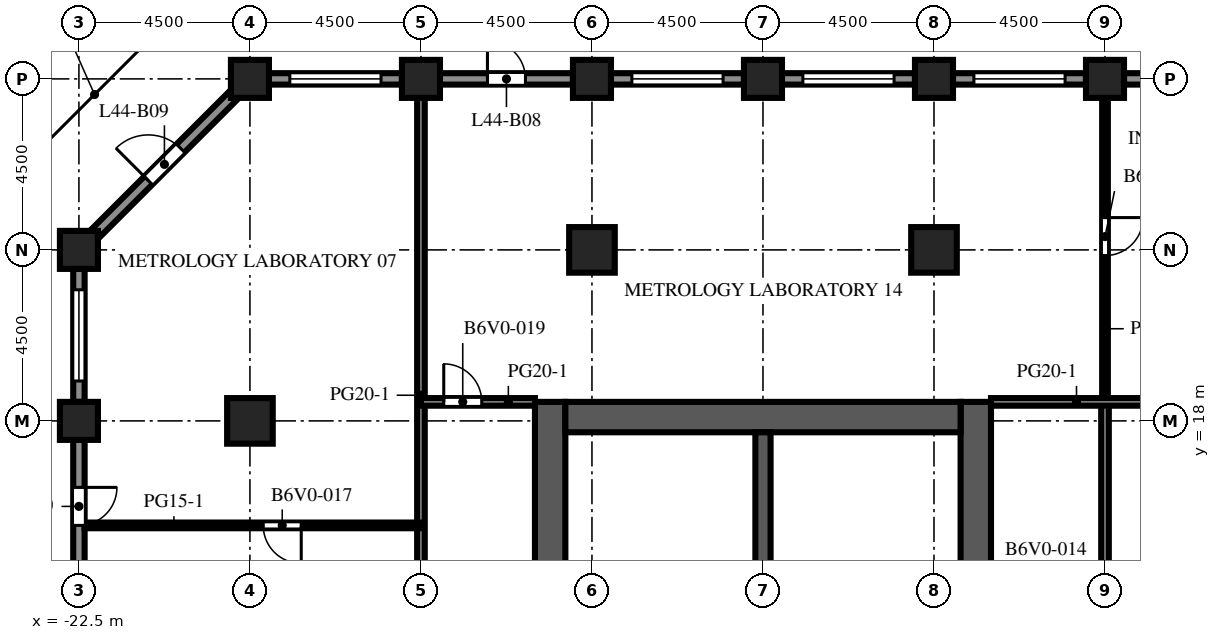
"""IFC4 building model, lengths in metres.
Left out: names, types, materials, properties, quantities, classifications, styles, units other than length and angle.
Written with IfcOpenShell. Run it as: python <this file> out.ifc"""

import sys

from ifc_helpers import new_model, si_unit, direction, frame, frame_2d, origin, origin_2d, place, context, subcontext, project, spatial, rectangle, extrude, element, fill, save


model = new_model("IFC4")
c1 = context("Model", 3, precision=1e-05, world=origin(), true_north=direction((0.0, 1.0)))
c2 = subcontext(c1, "Body", "Model", "MODEL_VIEW")
j1 = project(units=[si_unit("LENGTHUNIT", "METRE"), si_unit("PLANEANGLEUNIT", "RADIAN")], contexts=[c1])
p1 = place(None, origin())
s1 = spatial("IfcSite", under=j1, at=p1, CompositionType="ELEMENT")
p2 = place(p1, origin())
s2 = spatial("IfcBuilding", under=s1, at=p2, CompositionType="ELEMENT")
p3 = place(p2, frame((0.0, 0.0, 195.6)))
s3 = spatial("IfcBuildingStorey", under=s2, at=p3, CompositionType="ELEMENT", Elevation=195.6)
for number, where, z_axis, x_axis in (
    (1, (-22.5, 18.0, 0.0), (0.0, 0.0, 1.0), (1.0, 0.0, 0.0)),
    (2, (-22.5, 22.5, 0.0), (0.0, 0.0, 1.0), (1.0, 0.0, 0.0)),
    (3, (-18.0, 27.0, 0.0), (0.0, 0.0, 1.0), (1.0, 0.0, 0.0)),
    (4, (-13.5, 27.0, 0.0), (0.0, 0.0, 1.0), (1.0, 0.0, 0.0)),
    (5, (-9.0, 27.0, 0.0), (0.0, 0.0, 1.0), (1.0, 0.0, 0.0)),
    (6, (-4.5, 27.0, 0.0), (0.0, 0.0, 1.0), (1.0, 0.0, 0.0)),
    (7, (0.0, 27.0, 0.0), (0.0, 0.0, 1.0), (1.0, 0.0, 0.0)),
    (8, (4.5, 27.0, 0.0), (0.0, 0.0, 1.0), (1.0, 0.0, 0.0)),
):
    element("IfcColumn", number, at=place(p3, frame(where, z_axis=z_axis, x_axis=x_axis)), inside=s3, PredefinedType="COLUMN", context=c2, shape_type="SweptSolid", body=[
        extrude(rectangle(XDim=1.0, YDim=1.0, at=origin_2d()), origin(), (0.0, 0.0, 1.0), 4.1),
    ])
for number, where, z_axis, x_axis in (
    (9, (-18.0, 18.0, 0.0), (0.0, 0.0, 1.0), (1.0, 0.0, 0.0)),
    (10, (-9.0, 22.5, 0.0), (0.0, 0.0, 1.0), (1.0, 0.0, 0.0)),
    (11, (0.0, 22.5, 0.0), (0.0, 0.0, 1.0), (1.0, 0.0, 0.0)),
):
    element("IfcColumn", number, at=place(p3, frame(where, z_axis=z_axis, x_axis=x_axis)), inside=s3, PredefinedType="COLUMN", context=c2, shape_type="SweptSolid", body=[
        extrude(rectangle(XDim=1.2, YDim=1.2, at=origin_2d()), origin(), (0.0, 0.0, 1.0), 4.1),
    ])
p4 = place(p3, frame((-10.1, -9.0, 0.0), z_axis=(0.0, 0.0, 1.0), x_axis=(0.0, 1.0, 0.0)))
e12 = element("IfcWall", 12, at=p4, inside=s3, PredefinedType="SHEAR", context=c2, shape_type="SweptSolid", body=[
    extrude(rectangle(XDim=27.5, YDim=0.8, at=frame_2d((13.75, 0.0))), origin(), (0.0, 0.0, 1.0), 4.1),
])
p5 = place(p4, frame((12.55, 0.0, 0.0)))
e13 = element("IfcOpeningElement", 13, at=p5, cuts=e12, PredefinedType="OPENING", context=c2, shape_type="SweptSolid", body=[
    extrude(rectangle(XDim=2.4, YDim=2.4, at=frame_2d((1.2, 1.2))), frame((0.0, 0.41, 0.0), z_axis=(0.0, -1.0, 0.0), x_axis=(1.0, 0.0, 0.0)), (0.0, 0.0, 1.0), 0.82),
])
p6 = place(p4, frame((6.825, 0.0, 0.0)))
e14 = element("IfcOpeningElement", 14, at=p6, cuts=e12, PredefinedType="OPENING", context=c2, shape_type="SweptSolid", body=[
    extrude(rectangle(XDim=1.2, YDim=2.1, at=frame_2d((0.6, 1.05))), frame((0.0, 0.41, 0.0), z_axis=(0.0, -1.0, 0.0), x_axis=(1.0, 0.0, 0.0)), (0.0, 0.0, 1.0), 0.82),
])
p7 = place(p4, frame((19.475, 0.0, 0.0)))
e15 = element("IfcOpeningElement", 15, at=p7, cuts=e12, PredefinedType="OPENING", context=c2, shape_type="SweptSolid", body=[
    extrude(rectangle(XDim=1.2, YDim=2.1, at=frame_2d((0.6, 1.05))), frame((0.0, 0.41, 0.0), z_axis=(0.0, -1.0, 0.0), x_axis=(1.0, 0.0, 0.0)), (0.0, 0.0, 1.0), 0.82),
])
p8 = place(p3, frame((1.1, -9.0, 0.0), z_axis=(0.0, 0.0, 1.0), x_axis=(0.0, 1.0, 0.0)))
e16 = element("IfcWall", 16, at=p8, inside=s3, PredefinedType="SHEAR", context=c2, shape_type="SweptSolid", body=[
    extrude(rectangle(XDim=27.5, YDim=0.8, at=frame_2d((13.75, 0.0))), origin(), (0.0, 0.0, 1.0), 4.1),
])
p9 = place(p8, frame((12.55, 0.0, 0.0)))
e17 = element("IfcOpeningElement", 17, at=p9, cuts=e16, PredefinedType="OPENING", context=c2, shape_type="SweptSolid", body=[
    extrude(rectangle(XDim=2.4, YDim=2.4, at=frame_2d((1.2, 1.2))), frame((0.0, 0.41, 0.0), z_axis=(0.0, -1.0, 0.0), x_axis=(1.0, 0.0, 0.0)), (0.0, 0.0, 1.0), 0.82),
])
p10 = place(p8, frame((3.95, 0.0, 0.0)))
e18 = element("IfcOpeningElement", 18, at=p10, cuts=e16, PredefinedType="OPENING", context=c2, shape_type="SweptSolid", body=[
    extrude(rectangle(XDim=1.2, YDim=2.1, at=frame_2d((0.6, 1.05))), frame((0.0, 0.41, 0.0), z_axis=(0.0, -1.0, 0.0), x_axis=(1.0, 0.0, 0.0)), (0.0, 0.0, 1.0), 0.82),
])
p11 = place(p8, frame((19.45, 0.0, 0.0)))
e19 = element("IfcOpeningElement", 19, at=p11, cuts=e16, PredefinedType="OPENING", context=c2, shape_type="SweptSolid", body=[
    extrude(rectangle(XDim=1.0, YDim=2.1, at=frame_2d((0.5, 1.05))), frame((0.0, 0.41, 0.0), z_axis=(0.0, -1.0, 0.0), x_axis=(1.0, 0.0, 0.0)), (0.0, 0.0, 1.0), 0.82),
])
p12 = place(p8, frame((21.137, 0.0, 0.0)))
e20 = element("IfcOpeningElement", 20, at=p12, cuts=e16, PredefinedType="OPENING", context=c2, shape_type="SweptSolid", body=[
    extrude(rectangle(XDim=1.0, YDim=2.1, at=frame_2d((0.5, 1.05))), frame((0.0, 0.41, 0.0), z_axis=(0.0, -1.0, 0.0), x_axis=(1.0, 0.0, 0.0)), (0.0, 0.0, 1.0), 0.82),
])
p13 = place(p8, frame((23.2, 0.0, 0.0)))
e21 = element("IfcOpeningElement", 21, at=p13, cuts=e16, PredefinedType="OPENING", context=c2, shape_type="SweptSolid", body=[
    extrude(rectangle(XDim=1.0, YDim=2.1, at=frame_2d((0.5, 1.05))), frame((0.0, 0.41, 0.0), z_axis=(0.0, -1.0, 0.0), x_axis=(1.0, 0.0, 0.0)), (0.0, 0.0, 1.0), 0.82),
])
p14 = place(p8, frame((25.262, 0.0, 0.0)))
e22 = element("IfcOpeningElement", 22, at=p14, cuts=e16, PredefinedType="OPENING", context=c2, shape_type="SweptSolid", body=[
    extrude(rectangle(XDim=1.0, YDim=2.1, at=frame_2d((0.5, 1.05))), frame((0.0, 0.41, 0.0), z_axis=(0.0, -1.0, 0.0), x_axis=(1.0, 0.0, 0.0)), (0.0, 0.0, 1.0), 0.82),
])
p15 = place(p3, frame((-9.7, 18.1, 0.0), z_axis=(0.0, 0.0, 1.0), x_axis=(1.0, 0.0, 0.0)))
e23 = element("IfcWall", 23, at=p15, inside=s3, PredefinedType="SHEAR", context=c2, shape_type="SweptSolid", body=[
    extrude(rectangle(XDim=10.4, YDim=0.8, at=frame_2d((5.2, 0.0))), origin(), (0.0, 0.0, 1.0), 4.1),
])
p16 = place(p3, frame((-4.5, 10.2, 0.0), z_axis=(0.0, 0.0, 1.0), x_axis=(0.0, 1.0, 0.0)))
e24 = element("IfcWall", 24, at=p16, inside=s3, PredefinedType="SHEAR", context=c2, shape_type="SweptSolid", body=[
    extrude(rectangle(XDim=7.5, YDim=0.4, at=frame_2d((3.75, 0.0))), origin(), (0.0, 0.0, 1.0), 4.1),
])
p17 = place(p3, frame((5.0, 27.0, 0.0), z_axis=(0.0, 0.0, 1.0), x_axis=(1.0, 0.0, 0.0)))
e25 = element("IfcWall", 25, at=p17, inside=s3, PredefinedType="SOLIDWALL", context=c2, shape_type="SweptSolid", body=[
    extrude(rectangle(XDim=3.5, YDim=0.3, at=frame_2d((1.75, 0.0))), origin(), (0.0, 0.0, 1.0), 2.85),
])
p18 = place(p17, frame((0.55, 0.0, 0.8)))
e26 = element("IfcOpeningElement", 26, at=p18, cuts=e25, PredefinedType="OPENING", context=c2, shape_type="SweptSolid", body=[
    extrude(rectangle(XDim=2.4, YDim=1.7, at=frame_2d((1.2, 0.85))), frame((0.0, 0.16, 0.0), z_axis=(0.0, -1.0, 0.0), x_axis=(1.0, 0.0, 0.0)), (0.0, 0.0, 1.0), 0.32),
])
p19 = place(p3, frame((0.5, 27.0, 0.0), z_axis=(0.0, 0.0, 1.0), x_axis=(1.0, 0.0, 0.0)))
e27 = element("IfcWall", 27, at=p19, inside=s3, PredefinedType="SOLIDWALL", context=c2, shape_type="SweptSolid", body=[
    extrude(rectangle(XDim=3.5, YDim=0.3, at=frame_2d((1.75, 0.0))), origin(), (0.0, 0.0, 1.0), 2.85),
])
p20 = place(p19, frame((0.55, 0.0, 0.8)))
e28 = element("IfcOpeningElement", 28, at=p20, cuts=e27, PredefinedType="OPENING", context=c2, shape_type="SweptSolid", body=[
    extrude(rectangle(XDim=2.4, YDim=1.7, at=frame_2d((1.2, 0.85))), frame((0.0, 0.16, 0.0), z_axis=(0.0, -1.0, 0.0), x_axis=(1.0, 0.0, 0.0)), (0.0, 0.0, 1.0), 0.32),
])
p21 = place(p3, frame((-4.0, 27.0, 0.0), z_axis=(0.0, 0.0, 1.0), x_axis=(1.0, 0.0, 0.0)))
e29 = element("IfcWall", 29, at=p21, inside=s3, PredefinedType="SOLIDWALL", context=c2, shape_type="SweptSolid", body=[
    extrude(rectangle(XDim=3.5, YDim=0.3, at=frame_2d((1.75, 0.0))), origin(), (0.0, 0.0, 1.0), 2.85),
])
p22 = place(p21, frame((0.55, 0.0, 0.8)))
e30 = element("IfcOpeningElement", 30, at=p22, cuts=e29, PredefinedType="OPENING", context=c2, shape_type="SweptSolid", body=[
    extrude(rectangle(XDim=2.4, YDim=1.7, at=frame_2d((1.2, 0.85))), frame((0.0, 0.16, 0.0), z_axis=(0.0, -1.0, 0.0), x_axis=(1.0, 0.0, 0.0)), (0.0, 0.0, 1.0), 0.32),
])
p23 = place(p3, frame((-8.5, 27.0, 0.0), z_axis=(0.0, 0.0, 1.0), x_axis=(1.0, 0.0, 0.0)))
e31 = element("IfcWall", 31, at=p23, inside=s3, PredefinedType="SOLIDWALL", context=c2, shape_type="SweptSolid", body=[
    extrude(rectangle(XDim=3.5, YDim=0.3, at=frame_2d((1.75, 0.0))), origin(), (0.0, 0.0, 1.0), 2.85),
])
p24 = place(p23, frame((0.55, 0.0, 0.8)))
e32 = element("IfcOpeningElement", 32, at=p24, cuts=e31, PredefinedType="OPENING", context=c2, shape_type="SweptSolid", body=[
    extrude(rectangle(XDim=2.4, YDim=1.7, at=frame_2d((1.2, 0.85))), frame((0.0, 0.16, 0.0), z_axis=(0.0, -1.0, 0.0), x_axis=(1.0, 0.0, 0.0)), (0.0, 0.0, 1.0), 0.32),
])
p25 = place(p3, frame((-13.0, 27.0, 0.0), z_axis=(0.0, 0.0, 1.0), x_axis=(1.0, 0.0, 0.0)))
e33 = element("IfcWall", 33, at=p25, inside=s3, PredefinedType="SOLIDWALL", context=c2, shape_type="SweptSolid", body=[
    extrude(rectangle(XDim=3.5, YDim=0.3, at=frame_2d((1.75, 0.0))), origin(), (0.0, 0.0, 1.0), 2.85),
])
p26 = place(p25, frame((1.25, 0.0, 0.0)))
e34 = element("IfcOpeningElement", 34, at=p26, cuts=e33, PredefinedType="OPENING", context=c2, shape_type="SweptSolid", body=[
    extrude(rectangle(XDim=1.0, YDim=2.2, at=frame_2d((0.5, 1.1))), frame((0.0, 0.16, 0.0), z_axis=(0.0, -1.0, 0.0), x_axis=(1.0, 0.0, 0.0)), (0.0, 0.0, 1.0), 0.32),
])
p27 = place(p3, frame((-17.5, 27.0, 0.0), z_axis=(0.0, 0.0, 1.0), x_axis=(1.0, 0.0, 0.0)))
e35 = element("IfcWall", 35, at=p27, inside=s3, PredefinedType="SOLIDWALL", context=c2, shape_type="SweptSolid", body=[
    extrude(rectangle(XDim=3.5, YDim=0.3, at=frame_2d((1.75, 0.0))), origin(), (0.0, 0.0, 1.0), 2.85),
])
p28 = place(p27, frame((0.55, 0.0, 0.8)))
e36 = element("IfcOpeningElement", 36, at=p28, cuts=e35, PredefinedType="OPENING", context=c2, shape_type="SweptSolid", body=[
    extrude(rectangle(XDim=2.4, YDim=1.7, at=frame_2d((1.2, 0.85))), frame((0.0, 0.16, 0.0), z_axis=(0.0, -1.0, 0.0), x_axis=(1.0, 0.0, 0.0)), (0.0, 0.0, 1.0), 0.32),
])
p29 = place(p3, frame((-22.106, 22.894, 0.0), z_axis=(0.0, 0.0, 1.0), x_axis=(0.707106781187, 0.707106781187, 0.0)))
e37 = element("IfcWall", 37, at=p29, inside=s3, PredefinedType="SOLIDWALL", context=c2, shape_type="SweptSolid", body=[
    extrude(rectangle(XDim=5.25, YDim=0.3, at=frame_2d((2.625, 0.0))), origin(), (0.0, 0.0, 1.0), 2.85),
])
p30 = place(p29, frame((2.025, 0.0, 0.0)))
e38 = element("IfcOpeningElement", 38, at=p30, cuts=e37, PredefinedType="OPENING", context=c2, shape_type="SweptSolid", body=[
    extrude(rectangle(XDim=1.2, YDim=2.2, at=frame_2d((0.6, 1.1))), frame((0.0, 0.16, 0.0), z_axis=(0.0, -1.0, 0.0), x_axis=(1.0, 0.0, 0.0)), (0.0, 0.0, 1.0), 0.32),
])
p31 = place(p3, frame((-22.5, 18.5, 0.0), z_axis=(0.0, 0.0, 1.0), x_axis=(0.0, 1.0, 0.0)))
e39 = element("IfcWall", 39, at=p31, inside=s3, PredefinedType="SOLIDWALL", context=c2, shape_type="SweptSolid", body=[
    extrude(rectangle(XDim=3.5, YDim=0.3, at=frame_2d((1.75, 0.0))), origin(), (0.0, 0.0, 1.0), 2.85),
])
p32 = place(p31, frame((0.55, 0.0, 0.8)))
e40 = element("IfcOpeningElement", 40, at=p32, cuts=e39, PredefinedType="OPENING", context=c2, shape_type="SweptSolid", body=[
    extrude(rectangle(XDim=2.4, YDim=1.7, at=frame_2d((1.2, 0.85))), frame((0.0, 0.16, 0.0), z_axis=(0.0, -1.0, 0.0), x_axis=(1.0, 0.0, 0.0)), (0.0, 0.0, 1.0), 0.32),
])
p33 = place(p3, frame((-22.5, 14.0, 0.0), z_axis=(0.0, 0.0, 1.0), x_axis=(0.0, 1.0, 0.0)))
e41 = element("IfcWall", 41, at=p33, inside=s3, PredefinedType="SOLIDWALL", context=c2, shape_type="SweptSolid", body=[
    extrude(rectangle(XDim=3.5, YDim=0.3, at=frame_2d((1.75, 0.0))), origin(), (0.0, 0.0, 1.0), 2.85),
])
p34 = place(p33, frame((1.25, 0.0, 0.0)))
e42 = element("IfcOpeningElement", 42, at=p34, cuts=e41, PredefinedType="OPENING", context=c2, shape_type="SweptSolid", body=[
    extrude(rectangle(XDim=1.0, YDim=2.2, at=frame_2d((0.5, 1.1))), frame((0.0, 0.16, 0.0), z_axis=(0.0, -1.0, 0.0), x_axis=(1.0, 0.0, 0.0)), (0.0, 0.0, 1.0), 0.32),
])
p35 = place(p3, frame((-4.3, 15.825, 0.0), z_axis=(0.0, 0.0, 1.0), x_axis=(1.0, 0.0, 0.0)))
e43 = element("IfcWall", 43, at=p35, inside=s3, PredefinedType="PARTITIONING", context=c2, shape_type="SweptSolid", body=[
    extrude(rectangle(XDim=5.0, YDim=0.1, at=frame_2d((2.5, 0.0))), origin(), (0.0, 0.0, 1.0), 3.65),
])
p36 = place(p3, frame((-13.5, 6.25, 0.0), z_axis=(0.0, 0.0, 1.0), x_axis=(0.0, 1.0, 0.0)))
e44 = element("IfcWall", 44, at=p36, inside=s3, PredefinedType="PARTITIONING", context=c2, shape_type="SweptSolid", body=[
    extrude(rectangle(XDim=20.25, YDim=0.2, at=frame_2d((10.125, 0.0))), origin(), (0.0, 0.0, 1.0), 3.65),
])
p37 = place(p36, frame((3.6, 0.0, 0.0)))
e45 = element("IfcOpeningElement", 45, at=p37, cuts=e44, PredefinedType="OPENING", context=c2, shape_type="SweptSolid", body=[
    extrude(rectangle(XDim=1.0, YDim=2.1, at=frame_2d((0.5, 1.05))), frame((0.0, 0.11, 0.0), z_axis=(0.0, -1.0, 0.0), x_axis=(1.0, 0.0, 0.0)), (0.0, 0.0, 1.0), 0.22),
])
p38 = place(p3, frame((4.5, 26.5, 0.0), z_axis=(0.0, 0.0, 1.0), x_axis=(0.0, -1.0, 0.0)))
e46 = element("IfcWall", 46, at=p38, inside=s3, PredefinedType="PARTITIONING", context=c2, shape_type="SweptSolid", body=[
    extrude(rectangle(XDim=8.0, YDim=0.15, at=frame_2d((4.0, 0.0))), origin(), (0.0, 0.0, 1.0), 3.65),
])
p39 = place(p38, frame((3.15, 0.0, 0.0)))
e47 = element("IfcOpeningElement", 47, at=p39, cuts=e46, PredefinedType="OPENING", context=c2, shape_type="SweptSolid", body=[
    extrude(rectangle(XDim=1.0, YDim=2.1, at=frame_2d((0.5, 1.05))), frame((0.0, 0.085, 0.0), z_axis=(0.0, -1.0, 0.0), x_axis=(1.0, 0.0, 0.0)), (0.0, 0.0, 1.0), 0.17),
])
p40 = place(p3, frame((4.5, 18.5, 0.0), z_axis=(0.0, 0.0, 1.0), x_axis=(0.0, -1.0, 0.0)))
e48 = element("IfcWall", 48, at=p40, inside=s3, PredefinedType="PARTITIONING", context=c2, shape_type="SweptSolid", body=[
    extrude(rectangle(XDim=11.8, YDim=0.2, at=frame_2d((5.9, 0.0))), origin(), (0.0, 0.0, 1.0), 3.65),
])
p41 = place(p40, frame((4.95, 0.0, 0.0)))
e49 = element("IfcOpeningElement", 49, at=p41, cuts=e48, PredefinedType="OPENING", context=c2, shape_type="SweptSolid", body=[
    extrude(rectangle(XDim=1.0, YDim=2.1, at=frame_2d((0.5, 1.05))), frame((0.0, 0.11, 0.0), z_axis=(0.0, -1.0, 0.0), x_axis=(1.0, 0.0, 0.0)), (0.0, 0.0, 1.0), 0.22),
])
p42 = place(p3, frame((-22.35, 15.25, 0.0), z_axis=(0.0, 0.0, 1.0), x_axis=(1.0, 0.0, 0.0)))
e50 = element("IfcWall", 50, at=p42, inside=s3, PredefinedType="PARTITIONING", context=c2, shape_type="SweptSolid", body=[
    extrude(rectangle(XDim=8.85, YDim=0.15, at=frame_2d((4.425, 0.0))), origin(), (0.0, 0.0, 1.0), 3.65),
])
p43 = place(p42, frame((4.7, 0.0, 0.0)))
e51 = element("IfcOpeningElement", 51, at=p43, cuts=e50, PredefinedType="OPENING", context=c2, shape_type="SweptSolid", body=[
    extrude(rectangle(XDim=1.0, YDim=2.1, at=frame_2d((0.5, 1.05))), frame((0.0, 0.085, 0.0), z_axis=(0.0, -1.0, 0.0), x_axis=(1.0, 0.0, 0.0)), (0.0, 0.0, 1.0), 0.17),
])
p44 = place(p3, frame((-13.5, 18.5, 0.0), z_axis=(0.0, 0.0, 1.0), x_axis=(1.0, 0.0, 0.0)))
e52 = element("IfcWall", 52, at=p44, inside=s3, PredefinedType="PARTITIONING", context=c2, shape_type="SweptSolid", body=[
    extrude(rectangle(XDim=3.0, YDim=0.2, at=frame_2d((1.5, 0.0))), origin(), (0.0, 0.0, 1.0), 3.65),
])
p45 = place(p44, frame((0.6, 0.0, 0.0)))
e53 = element("IfcOpeningElement", 53, at=p45, cuts=e52, PredefinedType="OPENING", context=c2, shape_type="SweptSolid", body=[
    extrude(rectangle(XDim=1.0, YDim=2.1, at=frame_2d((0.5, 1.05))), frame((0.0, 0.11, 0.0), z_axis=(0.0, -1.0, 0.0), x_axis=(1.0, 0.0, 0.0)), (0.0, 0.0, 1.0), 0.22),
])
p46 = place(p3, frame((1.5, 18.5, 0.0), z_axis=(0.0, 0.0, 1.0), x_axis=(1.0, 0.0, 0.0)))
e54 = element("IfcWall", 54, at=p46, inside=s3, PredefinedType="PARTITIONING", context=c2, shape_type="SweptSolid", body=[
    extrude(rectangle(XDim=4.5, YDim=0.2, at=frame_2d((2.25, 0.0))), origin(), (0.0, 0.0, 1.0), 3.65),
])
p47 = place(p20, origin())
e55 = element("IfcWindow", 55, at=p47, inside=s3, PartitioningType="SINGLE_PANEL", PredefinedType="WINDOW", context=c2, shape_type="SweptSolid", body=[
    extrude(rectangle(XDim=2.4, YDim=1.7, at=frame_2d((1.2, 0.85))), frame((0.0, 0.03, 0.0), z_axis=(0.0, -1.0, 0.0), x_axis=(1.0, 0.0, 0.0)), (0.0, 0.0, 1.0), 0.06),
])
fill(e28, e55)
p48 = place(p22, origin())
e56 = element("IfcWindow", 56, at=p48, inside=s3, PartitioningType="SINGLE_PANEL", PredefinedType="WINDOW", context=c2, shape_type="SweptSolid", body=[
    extrude(rectangle(XDim=2.4, YDim=1.7, at=frame_2d((1.2, 0.85))), frame((0.0, 0.03, 0.0), z_axis=(0.0, -1.0, 0.0), x_axis=(1.0, 0.0, 0.0)), (0.0, 0.0, 1.0), 0.06),
])
fill(e30, e56)
p49 = place(p24, origin())
e57 = element("IfcWindow", 57, at=p49, inside=s3, PartitioningType="SINGLE_PANEL", PredefinedType="WINDOW", context=c2, shape_type="SweptSolid", body=[
    extrude(rectangle(XDim=2.4, YDim=1.7, at=frame_2d((1.2, 0.85))), frame((0.0, 0.03, 0.0), z_axis=(0.0, -1.0, 0.0), x_axis=(1.0, 0.0, 0.0)), (0.0, 0.0, 1.0), 0.06),
])
fill(e32, e57)
p50 = place(p26, origin())
e58 = element("IfcDoor", 58, at=p50, inside=s3, OperationType="SINGLE_SWING_LEFT", PredefinedType="DOOR", context=c2, shape_type="SweptSolid", body=[
    extrude(rectangle(XDim=1.0, YDim=2.2, at=frame_2d((0.5, 1.1))), frame((0.0, 0.025, 0.0), z_axis=(0.0, -1.0, 0.0), x_axis=(1.0, 0.0, 0.0)), (0.0, 0.0, 1.0), 0.05),
])
fill(e34, e58)
p51 = place(p28, origin())
e59 = element("IfcWindow", 59, at=p51, inside=s3, PartitioningType="SINGLE_PANEL", PredefinedType="WINDOW", context=c2, shape_type="SweptSolid", body=[
    extrude(rectangle(XDim=2.4, YDim=1.7, at=frame_2d((1.2, 0.85))), frame((0.0, 0.03, 0.0), z_axis=(0.0, -1.0, 0.0), x_axis=(1.0, 0.0, 0.0)), (0.0, 0.0, 1.0), 0.06),
])
fill(e36, e59)
p52 = place(p30, origin())
e60 = element("IfcDoor", 60, at=p52, inside=s3, OperationType="SINGLE_SWING_LEFT", PredefinedType="DOOR", context=c2, shape_type="SweptSolid", body=[
    extrude(rectangle(XDim=1.2, YDim=2.2, at=frame_2d((0.6, 1.1))), frame((0.0, 0.025, 0.0), z_axis=(0.0, -1.0, 0.0), x_axis=(1.0, 0.0, 0.0)), (0.0, 0.0, 1.0), 0.05),
])
fill(e38, e60)
p53 = place(p32, origin())
e61 = element("IfcWindow", 61, at=p53, inside=s3, PartitioningType="SINGLE_PANEL", PredefinedType="WINDOW", context=c2, shape_type="SweptSolid", body=[
    extrude(rectangle(XDim=2.4, YDim=1.7, at=frame_2d((1.2, 0.85))), frame((0.0, 0.03, 0.0), z_axis=(0.0, -1.0, 0.0), x_axis=(1.0, 0.0, 0.0)), (0.0, 0.0, 1.0), 0.06),
])
fill(e40, e61)
p54 = place(p34, origin())
e62 = element("IfcDoor", 62, at=p54, inside=s3, OperationType="SINGLE_SWING_RIGHT", PredefinedType="DOOR", context=c2, shape_type="SweptSolid", body=[
    extrude(rectangle(XDim=1.0, YDim=2.2, at=frame_2d((0.5, 1.1))), frame((0.0, 0.025, 0.0), z_axis=(0.0, -1.0, 0.0), x_axis=(1.0, 0.0, 0.0)), (0.0, 0.0, 1.0), 0.05),
])
fill(e42, e62)
p55 = place(p13, origin())
e63 = element("IfcDoor", 63, at=p55, inside=s3, OperationType="SINGLE_SWING_LEFT", PredefinedType="DOOR", context=c2, shape_type="SweptSolid", body=[
    extrude(rectangle(XDim=1.0, YDim=2.1, at=frame_2d((0.5, 1.05))), frame((0.0, 0.375, 0.0), z_axis=(0.0, -1.0, 0.0), x_axis=(1.0, 0.0, 0.0)), (0.0, 0.0, 1.0), 0.05),
])
fill(e21, e63)
p56 = place(p14, origin())
e64 = element("IfcDoor", 64, at=p56, inside=s3, OperationType="SINGLE_SWING_RIGHT", PredefinedType="DOOR", context=c2, shape_type="SweptSolid", body=[
    extrude(rectangle(XDim=1.0, YDim=2.1, at=frame_2d((0.5, 1.05))), frame((0.0, 0.375, 0.0), z_axis=(0.0, -1.0, 0.0), x_axis=(1.0, 0.0, 0.0)), (0.0, 0.0, 1.0), 0.05),
])
fill(e22, e64)
p57 = place(p39, origin())
e65 = element("IfcDoor", 65, at=p57, inside=s3, OperationType="SINGLE_SWING_LEFT", PredefinedType="DOOR", context=c2, shape_type="SweptSolid", body=[
    extrude(rectangle(XDim=1.0, YDim=2.1, at=frame_2d((0.5, 1.05))), frame((0.0, 0.025, 0.0), z_axis=(0.0, -1.0, 0.0), x_axis=(1.0, 0.0, 0.0)), (0.0, 0.0, 1.0), 0.05),
])
fill(e47, e65)
p58 = place(p43, origin())
e66 = element("IfcDoor", 66, at=p58, inside=s3, OperationType="SINGLE_SWING_RIGHT", PredefinedType="DOOR", context=c2, shape_type="SweptSolid", body=[
    extrude(rectangle(XDim=1.0, YDim=2.1, at=frame_2d((0.5, 1.05))), frame((0.0, 0.025, 0.0), z_axis=(0.0, -1.0, 0.0), x_axis=(1.0, 0.0, 0.0)), (0.0, 0.0, 1.0), 0.05),
])
fill(e51, e66)
p59 = place(p45, origin())
e67 = element("IfcDoor", 67, at=p59, inside=s3, OperationType="SINGLE_SWING_LEFT", PredefinedType="DOOR", context=c2, shape_type="SweptSolid", body=[
    extrude(rectangle(XDim=1.0, YDim=2.1, at=frame_2d((0.5, 1.05))), frame((0.0, 0.025, 0.0), z_axis=(0.0, -1.0, 0.0), x_axis=(1.0, 0.0, 0.0)), (0.0, 0.0, 1.0), 0.05),
])
fill(e53, e67)
save(model, sys.argv[1])
